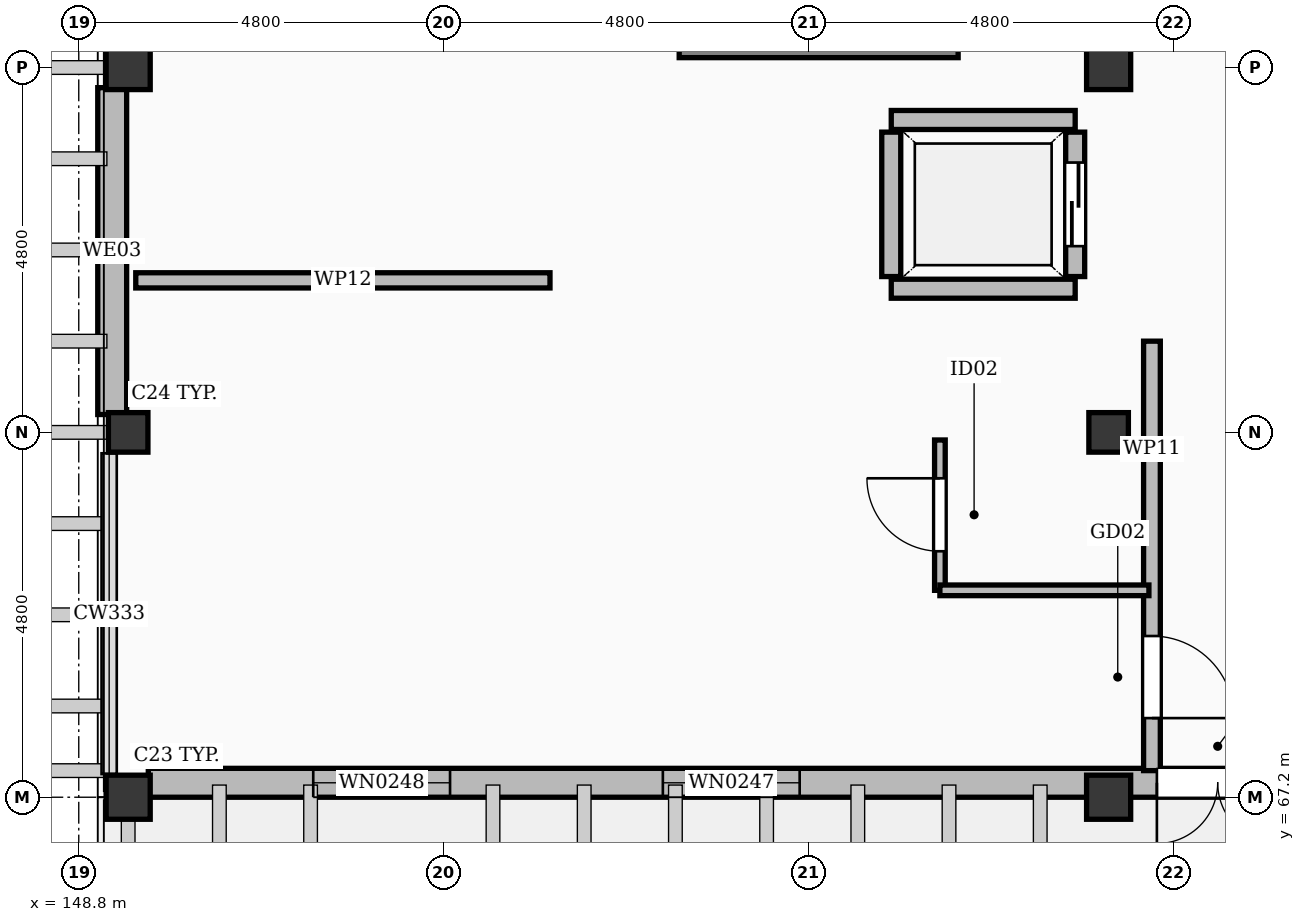
"""IFC4 building model, lengths in metres.
Left out: names, types, materials, properties, quantities, classifications, styles, units other than length and angle.
Written with IfcOpenShell. Run it as: python <this file> out.ifc"""

import sys

from ifc_helpers import new_model, si_unit, direction, frame, frame_2d, origin, origin_2d, place, context, subcontext, project, spatial, rectangle, extrude, element, fill, save


model = new_model("IFC4")
c1 = context("Model", 3, precision=1e-05, world=origin(), true_north=direction((0.0, 1.0)))
c2 = subcontext(c1, "Body", "Model", "MODEL_VIEW")
j1 = project(units=[si_unit("LENGTHUNIT", "METRE"), si_unit("PLANEANGLEUNIT", "RADIAN")], contexts=[c1])
p1 = place(None, origin())
s1 = spatial("IfcSite", under=j1, at=p1, CompositionType="ELEMENT")
p2 = place(p1, origin())
s2 = spatial("IfcBuilding", under=s1, at=p2, CompositionType="ELEMENT")
p3 = place(p2, frame((0.0, 0.0, 46.5)))
s3 = spatial("IfcBuildingStorey", under=s2, at=p3, CompositionType="ELEMENT", Elevation=46.5)
for number, where, z_axis, x_axis in (
    (1, (149.45, 67.2, 0.0), (0.0, 0.0, 1.0), (1.0, 0.0, 0.0)),
    (2, (149.45, 76.8, 0.0), (0.0, 0.0, 1.0), (1.0, 0.0, 0.0)),
    (3, (162.35, 67.2, 0.0), (0.0, 0.0, 1.0), (1.0, 0.0, 0.0)),
    (4, (162.35, 76.8, 0.0), (0.0, 0.0, 1.0), (1.0, 0.0, 0.0)),
):
    element("IfcColumn", number, at=place(p3, frame(where, z_axis=z_axis, x_axis=x_axis)), inside=s3, PredefinedType="COLUMN", context=c2, shape_type="SweptSolid", body=[
        extrude(rectangle(XDim=0.58, YDim=0.58, at=origin_2d()), origin(), (0.0, 0.0, 1.0), 3.9),
    ])
for number, where, z_axis, x_axis in (
    (5, (149.45, 72.0, 0.0), (0.0, 0.0, 1.0), (1.0, 0.0, 0.0)),
    (6, (162.35, 72.0, 0.0), (0.0, 0.0, 1.0), (1.0, 0.0, 0.0)),
):
    element("IfcColumn", number, at=place(p3, frame(where, z_axis=z_axis, x_axis=x_axis)), inside=s3, PredefinedType="COLUMN", context=c2, shape_type="SweptSolid", body=[
        extrude(rectangle(XDim=0.52, YDim=0.52, at=origin_2d()), origin(), (0.0, 0.0, 1.0), 3.9),
    ])
p4 = place(p3, frame((179.085, 67.39, 0.0), z_axis=(0.0, 0.0, 1.0), x_axis=(-1.0, 0.0, 0.0)))
e7 = element("IfcWall", 7, at=p4, inside=s3, PredefinedType="SOLIDWALL", context=c2, shape_type="SweptSolid", body=[
    extrude(rectangle(XDim=29.37, YDim=0.38, at=frame_2d((14.685, 0.0))), origin(), (0.0, 0.0, 1.0), 2.922),
])
p5 = place(p4, frame((14.5, 0.0, 0.0)))
e8 = element("IfcOpeningElement", 8, at=p5, cuts=e7, PredefinedType="OPENING", context=c2, shape_type="SweptSolid", body=[
    extrude(rectangle(XDim=1.6, YDim=2.25, at=frame_2d((0.8, 1.125))), frame((0.0, 0.202, 0.0), z_axis=(0.0, -1.0, 0.0), x_axis=(1.0, 0.0, 0.0)), (0.0, 0.0, 1.0), 0.404),
])
p6 = place(p4, frame((4.0, 0.0, 0.55)))
e9 = element("IfcOpeningElement", 9, at=p6, cuts=e7, PredefinedType="OPENING", context=c2, shape_type="SweptSolid", body=[
    extrude(rectangle(XDim=1.8, YDim=1.76, at=frame_2d((0.9, 0.88))), frame((0.0, 0.202, 0.0), z_axis=(0.0, -1.0, 0.0), x_axis=(1.0, 0.0, 0.0)), (0.0, 0.0, 1.0), 0.404),
])
p7 = place(p4, frame((9.6, 0.0, 0.55)))
e10 = element("IfcOpeningElement", 10, at=p7, cuts=e7, PredefinedType="OPENING", context=c2, shape_type="SweptSolid", body=[
    extrude(rectangle(XDim=1.8, YDim=1.76, at=frame_2d((0.9, 0.88))), frame((0.0, 0.202, 0.0), z_axis=(0.0, -1.0, 0.0), x_axis=(1.0, 0.0, 0.0)), (0.0, 0.0, 1.0), 0.404),
])
p8 = place(p4, frame((20.8, 0.0, 0.55)))
e11 = element("IfcOpeningElement", 11, at=p8, cuts=e7, PredefinedType="OPENING", context=c2, shape_type="SweptSolid", body=[
    extrude(rectangle(XDim=1.8, YDim=1.76, at=frame_2d((0.9, 0.88))), frame((0.0, 0.202, 0.0), z_axis=(0.0, -1.0, 0.0), x_axis=(1.0, 0.0, 0.0)), (0.0, 0.0, 1.0), 0.404),
])
p9 = place(p4, frame((25.4, 0.0, 0.55)))
e12 = element("IfcOpeningElement", 12, at=p9, cuts=e7, PredefinedType="OPENING", context=c2, shape_type="SweptSolid", body=[
    extrude(rectangle(XDim=1.8, YDim=1.76, at=frame_2d((0.9, 0.88))), frame((0.0, 0.202, 0.0), z_axis=(0.0, -1.0, 0.0), x_axis=(1.0, 0.0, 0.0)), (0.0, 0.0, 1.0), 0.404),
])
p10 = place(p3, frame((149.24, 72.235, 0.0), z_axis=(0.0, 0.0, 1.0), x_axis=(0.0, 1.0, 0.0)))
e13 = element("IfcWall", 13, at=p10, inside=s3, PredefinedType="SOLIDWALL", context=c2, shape_type="SweptSolid", body=[
    extrude(rectangle(XDim=4.3, YDim=0.38, at=frame_2d((2.15, 0.0))), origin(), (0.0, 0.0, 1.0), 3.072),
])
p11 = place(p3, frame((156.7, 77.18, 0.0), z_axis=(0.0, 0.0, 1.0), x_axis=(1.0, 0.0, 0.0)))
e14 = element("IfcWall", 14, at=p11, inside=s3, PredefinedType="SHEAR", context=c2, shape_type="SweptSolid", body=[
    extrude(rectangle(XDim=3.67, YDim=0.5, at=frame_2d((1.835, 0.0))), origin(), (0.0, 0.0, 1.0), 3.68),
])
for number, where, z_axis, x_axis in (
    (15, (159.49, 73.89, 0.0), (0.0, 0.0, 1.0), (1.0, 0.0, 0.0)),
    (16, (159.49, 76.11, 0.0), (0.0, 0.0, 1.0), (1.0, 0.0, 0.0)),
):
    element("IfcWall", number, at=place(p3, frame(where, z_axis=z_axis, x_axis=x_axis)), inside=s3, PredefinedType="SOLIDWALL", context=c2, shape_type="SweptSolid", body=[
        extrude(rectangle(XDim=2.42, YDim=0.25, at=frame_2d((1.21, 0.0))), origin(), (0.0, 0.0, 1.0), 3.68),
    ])
p12 = place(p3, frame((159.49, 74.05, 0.0), z_axis=(0.0, 0.0, 1.0), x_axis=(0.0, 1.0, 0.0)))
e17 = element("IfcWall", 17, at=p12, inside=s3, PredefinedType="SOLIDWALL", context=c2, shape_type="SweptSolid", body=[
    extrude(rectangle(XDim=1.9, YDim=0.25, at=frame_2d((0.95, 0.0))), origin(), (0.0, 0.0, 1.0), 3.68),
])
p13 = place(p3, frame((161.91, 74.05, 0.0), z_axis=(0.0, 0.0, 1.0), x_axis=(0.0, 1.0, 0.0)))
e18 = element("IfcWall", 18, at=p13, inside=s3, PredefinedType="SOLIDWALL", context=c2, shape_type="SweptSolid", body=[
    extrude(rectangle(XDim=1.9, YDim=0.25, at=frame_2d((0.95, 0.0))), origin(), (0.0, 0.0, 1.0), 3.68),
])
p14 = place(p13, frame((0.4, 0.0, 0.0)))
e19 = element("IfcOpeningElement", 19, at=p14, cuts=e18, PredefinedType="OPENING", context=c2, shape_type="SweptSolid", body=[
    extrude(rectangle(XDim=1.1, YDim=2.2, at=frame_2d((0.55, 1.1))), frame((0.0, 0.137, 0.0), z_axis=(0.0, -1.0, 0.0), x_axis=(1.0, 0.0, 0.0)), (0.0, 0.0, 1.0), 0.274),
])
p15 = place(p3, frame((162.92, 67.55, 0.0), z_axis=(0.0, 0.0, 1.0), x_axis=(0.0, 1.0, 0.0)))
e20 = element("IfcWall", 20, at=p15, inside=s3, PredefinedType="PARTITIONING", context=c2, shape_type="SweptSolid", body=[
    extrude(rectangle(XDim=5.65, YDim=0.22, at=frame_2d((2.825, 0.0))), origin(), (0.0, 0.0, 1.0), 3.072),
])
p16 = place(p15, frame((0.691, 0.0, 0.0)))
e21 = element("IfcOpeningElement", 21, at=p16, cuts=e20, PredefinedType="OPENING", context=c2, shape_type="SweptSolid", body=[
    extrude(rectangle(XDim=1.08, YDim=2.25, at=frame_2d((0.54, 1.125))), frame((0.0, 0.122, 0.0), z_axis=(0.0, -1.0, 0.0), x_axis=(1.0, 0.0, 0.0)), (0.0, 0.0, 1.0), 0.244),
])
p17 = place(p3, frame((149.55, 74.0, 0.0), z_axis=(0.0, 0.0, 1.0), x_axis=(1.0, 0.0, 0.0)))
e22 = element("IfcWall", 22, at=p17, inside=s3, PredefinedType="PARTITIONING", context=c2, shape_type="SweptSolid", body=[
    extrude(rectangle(XDim=5.45, YDim=0.2, at=frame_2d((2.725, 0.0))), origin(), (0.0, 0.0, 1.0), 3.68),
])
p18 = place(p3, frame((160.13, 69.922, 0.0), z_axis=(0.0, 0.0, 1.0), x_axis=(0.0, 1.0, 0.0)))
e23 = element("IfcWall", 23, at=p18, inside=s3, PredefinedType="PARTITIONING", context=c2, shape_type="SweptSolid", body=[
    extrude(rectangle(XDim=1.978, YDim=0.14, at=frame_2d((0.989, 0.0))), origin(), (0.0, 0.0, 1.0), 3.072),
])
p19 = place(p18, frame((0.514, 0.0, 0.0)))
e24 = element("IfcOpeningElement", 24, at=p19, cuts=e23, PredefinedType="OPENING", context=c2, shape_type="SweptSolid", body=[
    extrude(rectangle(XDim=0.96, YDim=2.12, at=frame_2d((0.48, 1.06))), frame((0.0, 0.082, 0.0), z_axis=(0.0, -1.0, 0.0), x_axis=(1.0, 0.0, 0.0)), (0.0, 0.0, 1.0), 0.164),
])
p20 = place(p3, frame((160.13, 69.922, 0.0), z_axis=(0.0, 0.0, 1.0), x_axis=(1.0, 0.0, 0.0)))
e25 = element("IfcWall", 25, at=p20, inside=s3, PredefinedType="PARTITIONING", context=c2, shape_type="SweptSolid", body=[
    extrude(rectangle(XDim=2.75, YDim=0.14, at=frame_2d((1.375, 0.0))), origin(), (0.0, 0.0, 1.0), 3.072),
])
p21 = place(p5, origin())
e26 = element("IfcDoor", 26, at=p21, inside=s3, OperationType="DOUBLE_DOOR_SINGLE_SWING", PredefinedType="DOOR", context=c2, shape_type="SweptSolid", body=[
    extrude(rectangle(XDim=1.6, YDim=2.25, at=frame_2d((0.8, 1.125))), frame((0.0, 0.025, 0.0), z_axis=(0.0, -1.0, 0.0), x_axis=(1.0, 0.0, 0.0)), (0.0, 0.0, 1.0), 0.05),
])
fill(e8, e26)
p22 = place(p8, origin())
e27 = element("IfcWindow", 27, at=p22, inside=s3, PartitioningType="SINGLE_PANEL", PredefinedType="WINDOW", context=c2, shape_type="SweptSolid", body=[
    extrude(rectangle(XDim=1.8, YDim=1.76, at=frame_2d((0.9, 0.88))), frame((0.0, 0.03, 0.0), z_axis=(0.0, -1.0, 0.0), x_axis=(1.0, 0.0, 0.0)), (0.0, 0.0, 1.0), 0.06),
])
fill(e11, e27)
p23 = place(p9, origin())
e28 = element("IfcWindow", 28, at=p23, inside=s3, PartitioningType="SINGLE_PANEL", PredefinedType="WINDOW", context=c2, shape_type="SweptSolid", body=[
    extrude(rectangle(XDim=1.8, YDim=1.76, at=frame_2d((0.9, 0.88))), frame((0.0, 0.03, 0.0), z_axis=(0.0, -1.0, 0.0), x_axis=(1.0, 0.0, 0.0)), (0.0, 0.0, 1.0), 0.06),
])
fill(e12, e28)
p24 = place(p14, origin())
e29 = element("IfcDoor", 29, at=p24, inside=s3, OperationType="SLIDING_TO_LEFT", PredefinedType="DOOR", context=c2, shape_type="SweptSolid", body=[
    extrude(rectangle(XDim=1.1, YDim=2.2, at=frame_2d((0.55, 1.1))), frame((0.0, 0.025, 0.0), z_axis=(0.0, -1.0, 0.0), x_axis=(1.0, 0.0, 0.0)), (0.0, 0.0, 1.0), 0.05),
])
fill(e19, e29)
p25 = place(p16, frame((1.08, 0.0, 0.0), z_axis=(0.0, 0.0, 1.0), x_axis=(-1.0, 0.0, 0.0)))
e30 = element("IfcDoor", 30, at=p25, inside=s3, OperationType="SINGLE_SWING_LEFT", PredefinedType="DOOR", context=c2, shape_type="SweptSolid", body=[
    extrude(rectangle(XDim=1.08, YDim=2.25, at=frame_2d((0.54, 1.125))), frame((0.0, 0.025, 0.0), z_axis=(0.0, -1.0, 0.0), x_axis=(1.0, 0.0, 0.0)), (0.0, 0.0, 1.0), 0.05),
])
fill(e21, e30)
p26 = place(p19, origin())
e31 = element("IfcDoor", 31, at=p26, inside=s3, OperationType="SINGLE_SWING_RIGHT", PredefinedType="DOOR", context=c2, shape_type="SweptSolid", body=[
    extrude(rectangle(XDim=0.96, YDim=2.12, at=frame_2d((0.48, 1.06))), frame((0.0, 0.025, 0.0), z_axis=(0.0, -1.0, 0.0), x_axis=(1.0, 0.0, 0.0)), (0.0, 0.0, 1.0), 0.05),
])
fill(e24, e31)
save(model, sys.argv[1])
